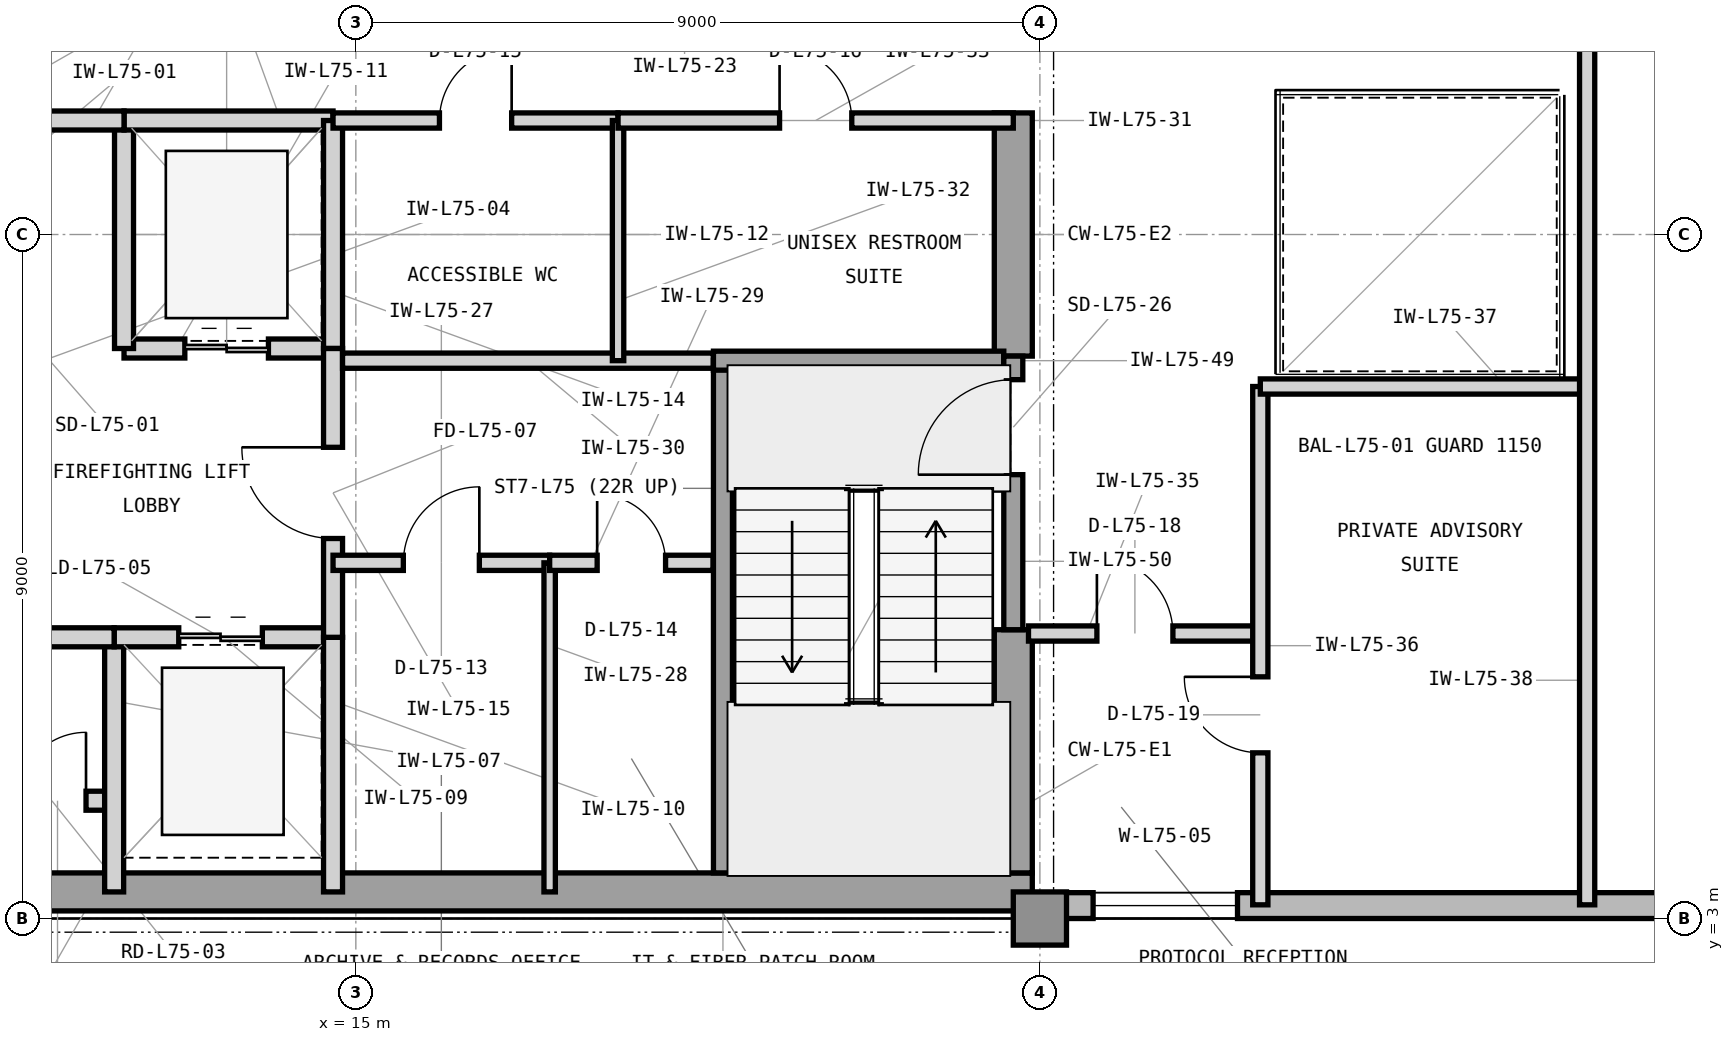
"""IFC4 building model, lengths in metres.
Left out: names, types, materials, properties, quantities, classifications, styles, units other than length and angle.
Written with IfcOpenShell. Run it as: python <this file> out.ifc"""

import sys

from ifc_helpers import new_model, si_unit, direction, frame, frame_2d, origin, origin_2d, place, context, subcontext, project, spatial, rectangle, extrude, element, fill, save


model = new_model("IFC4")
c1 = context("Model", 3, precision=1e-05, world=origin(), true_north=direction((0.0, 1.0)))
c2 = subcontext(c1, "Body", "Model", "MODEL_VIEW")
j1 = project(units=[si_unit("LENGTHUNIT", "METRE"), si_unit("PLANEANGLEUNIT", "RADIAN")], contexts=[c1])
p1 = place(None, origin())
s1 = spatial("IfcSite", under=j1, at=p1, CompositionType="ELEMENT")
p2 = place(p1, origin())
s2 = spatial("IfcBuilding", under=s1, at=p2, CompositionType="ELEMENT")
p3 = place(p2, frame((0.0, 0.0, 305.4)))
s3 = spatial("IfcBuildingStorey", under=s2, at=p3, CompositionType="ELEMENT", Elevation=305.4)
p4 = place(p3, frame((7.475, 3.35, 0.0), z_axis=(0.0, 0.0, 1.0), x_axis=(1.0, 0.0, 0.0)))
e1 = element("IfcWall", 1, at=p4, inside=s3, PredefinedType="SHEAR", context=c2, shape_type="SweptSolid", body=[
    extrude(rectangle(XDim=16.425, YDim=0.5, at=frame_2d((8.212, 0.0))), origin(), (0.0, 0.0, 1.0), 3.9),
])
p5 = place(p3, frame((23.65, 3.6, 0.0), z_axis=(0.0, 0.0, 1.0), x_axis=(0.0, 1.0, 0.0)))
e2 = element("IfcWall", 2, at=p5, inside=s3, PredefinedType="SHEAR", context=c2, shape_type="SweptSolid", body=[
    extrude(rectangle(XDim=3.2, YDim=0.5, at=frame_2d((1.6, 0.0))), origin(), (0.0, 0.0, 1.0), 3.9),
])
p6 = place(p3, frame((23.65, 10.4, 0.0), z_axis=(0.0, 0.0, 1.0), x_axis=(0.0, 1.0, 0.0)))
e3 = element("IfcWall", 3, at=p6, inside=s3, PredefinedType="SHEAR", context=c2, shape_type="SweptSolid", body=[
    extrude(rectangle(XDim=3.2, YDim=0.5, at=frame_2d((1.6, 0.0))), origin(), (0.0, 0.0, 1.0), 3.9),
])
p7 = place(p3, frame((24.0, 3.0, 0.0), z_axis=(0.0, 0.0, 1.0), x_axis=(1.0, 0.0, 0.0)))
e4 = element("IfcColumn", 4, at=p7, inside=s3, PredefinedType="COLUMN", context=c2, shape_type="SweptSolid", body=[
    extrude(rectangle(XDim=0.7, YDim=0.7, at=origin_2d()), origin(), (0.0, 0.0, 1.0), 3.9),
])
p8 = place(p3, frame((23.9, 3.17, 0.0), z_axis=(0.0, 0.0, 1.0), x_axis=(1.0, 0.0, 0.0)))
e5 = element("IfcWall", 5, at=p8, inside=s3, PredefinedType="STANDARD", context=c2, shape_type="SweptSolid", body=[
    extrude(rectangle(XDim=25.5, YDim=0.34, at=frame_2d((12.75, 0.0))), origin(), (0.0, 0.0, 1.0), 3.715),
])
p9 = place(p8, frame((0.8, 0.0, 0.8)))
e6 = element("IfcOpeningElement", 6, at=p9, cuts=e5, PredefinedType="OPENING", context=c2, shape_type="SweptSolid", body=[
    extrude(rectangle(XDim=1.9, YDim=2.35, at=frame_2d((0.95, 1.175))), frame((0.0, 0.18, 0.0), z_axis=(0.0, -1.0, 0.0), x_axis=(1.0, 0.0, 0.0)), (0.0, 0.0, 1.0), 0.36),
])
p10 = place(p8, frame((10.075, 0.0, 0.8)))
e7 = element("IfcOpeningElement", 7, at=p10, cuts=e5, PredefinedType="OPENING", context=c2, shape_type="SweptSolid", body=[
    extrude(rectangle(XDim=2.6, YDim=2.35, at=frame_2d((1.3, 1.175))), frame((0.0, 0.18, 0.0), z_axis=(0.0, -1.0, 0.0), x_axis=(1.0, 0.0, 0.0)), (0.0, 0.0, 1.0), 0.36),
])
p11 = place(p8, frame((14.525, 0.0, 0.8)))
e8 = element("IfcOpeningElement", 8, at=p11, cuts=e5, PredefinedType="OPENING", context=c2, shape_type="SweptSolid", body=[
    extrude(rectangle(XDim=2.6, YDim=2.35, at=frame_2d((1.3, 1.175))), frame((0.0, 0.18, 0.0), z_axis=(0.0, -1.0, 0.0), x_axis=(1.0, 0.0, 0.0)), (0.0, 0.0, 1.0), 0.36),
])
p12 = place(p3, frame((10.33, 4.55, 0.0), z_axis=(0.0, 0.0, 1.0), x_axis=(1.0, 0.0, 0.0)))
e9 = element("IfcWall", 9, at=p12, inside=s3, PredefinedType="PARTITIONING", context=c2, shape_type="SweptSolid", body=[
    extrude(rectangle(XDim=1.49, YDim=0.25, at=frame_2d((0.745, 0.0))), origin(), (0.0, 0.0, 1.0), 3.705),
])
p13 = place(p12, frame((0.22, 0.0, 0.0)))
e10 = element("IfcOpeningElement", 10, at=p13, cuts=e9, PredefinedType="OPENING", context=c2, shape_type="SweptSolid", body=[
    extrude(rectangle(XDim=0.9, YDim=2.1, at=frame_2d((0.45, 1.05))), frame((0.0, 0.135, 0.0), z_axis=(0.0, -1.0, 0.0), x_axis=(1.0, 0.0, 0.0)), (0.0, 0.0, 1.0), 0.27),
])
p14 = place(p3, frame((11.82, 3.35, 0.0), z_axis=(0.0, 0.0, 1.0), x_axis=(0.0, 1.0, 0.0)))
e11 = element("IfcWall", 11, at=p14, inside=s3, PredefinedType="PARTITIONING", context=c2, shape_type="SweptSolid", body=[
    extrude(rectangle(XDim=3.35, YDim=0.25, at=frame_2d((1.675, 0.0))), origin(), (0.0, 0.0, 1.0), 3.705),
])
p15 = place(p3, frame((11.82, 6.7, 0.0), z_axis=(0.0, 0.0, 1.0), x_axis=(1.0, 0.0, 0.0)))
e12 = element("IfcWall", 12, at=p15, inside=s3, PredefinedType="PARTITIONING", context=c2, shape_type="SweptSolid", body=[
    extrude(rectangle(XDim=2.88, YDim=0.25, at=frame_2d((1.44, 0.0))), origin(), (0.0, 0.0, 1.0), 3.354),
])
p16 = place(p15, frame((0.85, 0.0, 0.0)))
e13 = element("IfcOpeningElement", 13, at=p16, cuts=e12, PredefinedType="OPENING", context=c2, shape_type="SweptSolid", body=[
    extrude(rectangle(XDim=1.1, YDim=2.25, at=frame_2d((0.55, 1.125))), frame((0.0, 0.135, 0.0), z_axis=(0.0, -1.0, 0.0), x_axis=(1.0, 0.0, 0.0)), (0.0, 0.0, 1.0), 0.27),
])
p17 = place(p3, frame((14.7, 3.35, 0.0), z_axis=(0.0, 0.0, 1.0), x_axis=(0.0, 1.0, 0.0)))
e14 = element("IfcWall", 14, at=p17, inside=s3, PredefinedType="PARTITIONING", context=c2, shape_type="SweptSolid", body=[
    extrude(rectangle(XDim=3.35, YDim=0.25, at=frame_2d((1.675, 0.0))), origin(), (0.0, 0.0, 1.0), 3.705),
])
p18 = place(p3, frame((11.95, 10.5, 0.0), z_axis=(0.0, 0.0, 1.0), x_axis=(1.0, 0.0, 0.0)))
e15 = element("IfcWall", 15, at=p18, inside=s3, PredefinedType="PARTITIONING", context=c2, shape_type="SweptSolid", body=[
    extrude(rectangle(XDim=2.75, YDim=0.25, at=frame_2d((1.375, 0.0))), origin(), (0.0, 0.0, 1.0), 3.354),
])
p19 = place(p18, frame((0.8, 0.0, 0.0)))
e16 = element("IfcOpeningElement", 16, at=p19, cuts=e15, PredefinedType="OPENING", context=c2, shape_type="SweptSolid", body=[
    extrude(rectangle(XDim=1.1, YDim=2.25, at=frame_2d((0.55, 1.125))), frame((0.0, 0.135, 0.0), z_axis=(0.0, -1.0, 0.0), x_axis=(1.0, 0.0, 0.0)), (0.0, 0.0, 1.0), 0.27),
])
p20 = place(p3, frame((11.95, 10.5, 0.0), z_axis=(0.0, 0.0, 1.0), x_axis=(0.0, 1.0, 0.0)))
e17 = element("IfcWall", 17, at=p20, inside=s3, PredefinedType="PARTITIONING", context=c2, shape_type="SweptSolid", body=[
    extrude(rectangle(XDim=3.0, YDim=0.25, at=frame_2d((1.5, 0.0))), origin(), (0.0, 0.0, 1.0), 3.705),
])
p21 = place(p3, frame((11.95, 13.5, 0.0), z_axis=(0.0, 0.0, 1.0), x_axis=(1.0, 0.0, 0.0)))
e18 = element("IfcWall", 18, at=p21, inside=s3, PredefinedType="PARTITIONING", context=c2, shape_type="SweptSolid", body=[
    extrude(rectangle(XDim=2.75, YDim=0.25, at=frame_2d((1.375, 0.0))), origin(), (0.0, 0.0, 1.0), 3.354),
])
p22 = place(p3, frame((14.7, 10.5, 0.0), z_axis=(0.0, 0.0, 1.0), x_axis=(0.0, 1.0, 0.0)))
e19 = element("IfcWall", 19, at=p22, inside=s3, PredefinedType="PARTITIONING", context=c2, shape_type="SweptSolid", body=[
    extrude(rectangle(XDim=3.0, YDim=0.25, at=frame_2d((1.5, 0.0))), origin(), (0.0, 0.0, 1.0), 3.705),
])
p23 = place(p3, frame((14.7, 6.7, 0.0), z_axis=(0.0, 0.0, 1.0), x_axis=(0.0, 1.0, 0.0)))
e20 = element("IfcWall", 20, at=p23, inside=s3, PredefinedType="PARTITIONING", context=c2, shape_type="SweptSolid", body=[
    extrude(rectangle(XDim=3.8, YDim=0.25, at=frame_2d((1.9, 0.0))), origin(), (0.0, 0.0, 1.0), 3.705),
])
p24 = place(p23, frame((1.3, 0.0, 0.0)))
e21 = element("IfcOpeningElement", 21, at=p24, cuts=e20, PredefinedType="OPENING", context=c2, shape_type="SweptSolid", body=[
    extrude(rectangle(XDim=1.2, YDim=2.2, at=frame_2d((0.6, 1.1))), frame((0.0, 0.135, 0.0), z_axis=(0.0, -1.0, 0.0), x_axis=(1.0, 0.0, 0.0)), (0.0, 0.0, 1.0), 0.27),
])
p25 = place(p3, frame((10.33, 13.5, 0.0), z_axis=(0.0, 0.0, 1.0), x_axis=(1.0, 0.0, 0.0)))
e22 = element("IfcWall", 22, at=p25, inside=s3, PredefinedType="PARTITIONING", context=c2, shape_type="SweptSolid", body=[
    extrude(rectangle(XDim=1.62, YDim=0.25, at=frame_2d((0.81, 0.0))), origin(), (0.0, 0.0, 1.0), 3.354),
])
p26 = place(p3, frame((10.33, 6.7, 0.0), z_axis=(0.0, 0.0, 1.0), x_axis=(1.0, 0.0, 0.0)))
e23 = element("IfcWall", 23, at=p26, inside=s3, PredefinedType="PARTITIONING", context=c2, shape_type="SweptSolid", body=[
    extrude(rectangle(XDim=1.49, YDim=0.25, at=frame_2d((0.745, 0.0))), origin(), (0.0, 0.0, 1.0), 3.354),
])
p27 = place(p3, frame((14.7, 7.68, 0.0), z_axis=(0.0, 0.0, 1.0), x_axis=(1.0, 0.0, 0.0)))
e24 = element("IfcWall", 24, at=p27, inside=s3, PredefinedType="PARTITIONING", context=c2, shape_type="SweptSolid", body=[
    extrude(rectangle(XDim=2.85, YDim=0.2, at=frame_2d((1.425, 0.0))), origin(), (0.0, 0.0, 1.0), 3.705),
])
p28 = place(p27, frame((0.925, 0.0, 0.0)))
e25 = element("IfcOpeningElement", 25, at=p28, cuts=e24, PredefinedType="OPENING", context=c2, shape_type="SweptSolid", body=[
    extrude(rectangle(XDim=1.0, YDim=2.15, at=frame_2d((0.5, 1.075))), frame((0.0, 0.11, 0.0), z_axis=(0.0, -1.0, 0.0), x_axis=(1.0, 0.0, 0.0)), (0.0, 0.0, 1.0), 0.22),
])
p29 = place(p3, frame((17.55, 3.35, 0.0), z_axis=(0.0, 0.0, 1.0), x_axis=(0.0, 1.0, 0.0)))
e26 = element("IfcWall", 26, at=p29, inside=s3, PredefinedType="PARTITIONING", context=c2, shape_type="SweptSolid", body=[
    extrude(rectangle(XDim=4.33, YDim=0.15, at=frame_2d((2.165, 0.0))), origin(), (0.0, 0.0, 1.0), 3.705),
])
p30 = place(p3, frame((17.55, 7.68, 0.0), z_axis=(0.0, 0.0, 1.0), x_axis=(1.0, 0.0, 0.0)))
e27 = element("IfcWall", 27, at=p30, inside=s3, PredefinedType="PARTITIONING", context=c2, shape_type="SweptSolid", body=[
    extrude(rectangle(XDim=2.15, YDim=0.2, at=frame_2d((1.075, 0.0))), origin(), (0.0, 0.0, 1.0), 3.705),
])
p31 = place(p30, frame((0.625, 0.0, 0.0)))
e28 = element("IfcOpeningElement", 28, at=p31, cuts=e27, PredefinedType="OPENING", context=c2, shape_type="SweptSolid", body=[
    extrude(rectangle(XDim=0.9, YDim=2.1, at=frame_2d((0.45, 1.05))), frame((0.0, 0.11, 0.0), z_axis=(0.0, -1.0, 0.0), x_axis=(1.0, 0.0, 0.0)), (0.0, 0.0, 1.0), 0.22),
])
p32 = place(p3, frame((14.825, 10.34, 0.0), z_axis=(0.0, 0.0, 1.0), x_axis=(1.0, 0.0, 0.0)))
e29 = element("IfcWall", 29, at=p32, inside=s3, PredefinedType="PARTITIONING", context=c2, shape_type="SweptSolid", body=[
    extrude(rectangle(XDim=4.88, YDim=0.2, at=frame_2d((2.44, 0.0))), origin(), (0.0, 0.0, 1.0), 3.705),
])
p33 = place(p3, frame((14.7, 13.5, 0.0), z_axis=(0.0, 0.0, 1.0), x_axis=(1.0, 0.0, 0.0)))
e30 = element("IfcWall", 30, at=p33, inside=s3, PredefinedType="PARTITIONING", context=c2, shape_type="SweptSolid", body=[
    extrude(rectangle(XDim=3.75, YDim=0.2, at=frame_2d((1.875, 0.0))), origin(), (0.0, 0.0, 1.0), 3.354),
])
p34 = place(p33, frame((1.4, 0.0, 0.0)))
e31 = element("IfcOpeningElement", 31, at=p34, cuts=e30, PredefinedType="OPENING", context=c2, shape_type="SweptSolid", body=[
    extrude(rectangle(XDim=0.95, YDim=2.1, at=frame_2d((0.475, 1.05))), frame((0.0, 0.11, 0.0), z_axis=(0.0, -1.0, 0.0), x_axis=(1.0, 0.0, 0.0)), (0.0, 0.0, 1.0), 0.22),
])
p35 = place(p3, frame((18.45, 10.34, 0.0), z_axis=(0.0, 0.0, 1.0), x_axis=(0.0, 1.0, 0.0)))
e32 = element("IfcWall", 32, at=p35, inside=s3, PredefinedType="PARTITIONING", context=c2, shape_type="SweptSolid", body=[
    extrude(rectangle(XDim=3.16, YDim=0.15, at=frame_2d((1.58, 0.0))), origin(), (0.0, 0.0, 1.0), 3.705),
])
p36 = place(p3, frame((18.45, 13.5, 0.0), z_axis=(0.0, 0.0, 1.0), x_axis=(1.0, 0.0, 0.0)))
e33 = element("IfcWall", 33, at=p36, inside=s3, PredefinedType="PARTITIONING", context=c2, shape_type="SweptSolid", body=[
    extrude(rectangle(XDim=5.2, YDim=0.2, at=frame_2d((2.6, 0.0))), origin(), (0.0, 0.0, 1.0), 3.354),
])
p37 = place(p36, frame((2.125, 0.0, 0.0)))
e34 = element("IfcOpeningElement", 34, at=p37, cuts=e33, PredefinedType="OPENING", context=c2, shape_type="SweptSolid", body=[
    extrude(rectangle(XDim=0.95, YDim=2.1, at=frame_2d((0.475, 1.05))), frame((0.0, 0.11, 0.0), z_axis=(0.0, -1.0, 0.0), x_axis=(1.0, 0.0, 0.0)), (0.0, 0.0, 1.0), 0.22),
])
p38 = place(p3, frame((23.85, 6.75, 0.0), z_axis=(0.0, 0.0, 1.0), x_axis=(1.0, 0.0, 0.0)))
e35 = element("IfcWall", 35, at=p38, inside=s3, PredefinedType="PARTITIONING", context=c2, shape_type="SweptSolid", body=[
    extrude(rectangle(XDim=3.05, YDim=0.2, at=frame_2d((1.525, 0.0))), origin(), (0.0, 0.0, 1.0), 3.705),
])
p39 = place(p38, frame((0.9, 0.0, 0.0)))
e36 = element("IfcOpeningElement", 36, at=p39, cuts=e35, PredefinedType="OPENING", context=c2, shape_type="SweptSolid", body=[
    extrude(rectangle(XDim=1.0, YDim=2.15, at=frame_2d((0.5, 1.075))), frame((0.0, 0.11, 0.0), z_axis=(0.0, -1.0, 0.0), x_axis=(1.0, 0.0, 0.0)), (0.0, 0.0, 1.0), 0.22),
])
p40 = place(p3, frame((26.9, 3.18, 0.0), z_axis=(0.0, 0.0, 1.0), x_axis=(0.0, 1.0, 0.0)))
e37 = element("IfcWall", 37, at=p40, inside=s3, PredefinedType="PARTITIONING", context=c2, shape_type="SweptSolid", body=[
    extrude(rectangle(XDim=6.82, YDim=0.2, at=frame_2d((3.41, 0.0))), origin(), (0.0, 0.0, 1.0), 3.705),
])
p41 = place(p40, frame((2.0, 0.0, 0.0)))
e38 = element("IfcOpeningElement", 38, at=p41, cuts=e37, PredefinedType="OPENING", context=c2, shape_type="SweptSolid", body=[
    extrude(rectangle(XDim=1.0, YDim=2.15, at=frame_2d((0.5, 1.075))), frame((0.0, 0.11, 0.0), z_axis=(0.0, -1.0, 0.0), x_axis=(1.0, 0.0, 0.0)), (0.0, 0.0, 1.0), 0.22),
])
p42 = place(p3, frame((26.9, 10.0, 0.0), z_axis=(0.0, 0.0, 1.0), x_axis=(1.0, 0.0, 0.0)))
e39 = element("IfcWall", 39, at=p42, inside=s3, PredefinedType="PARTITIONING", context=c2, shape_type="SweptSolid", body=[
    extrude(rectangle(XDim=4.3, YDim=0.2, at=frame_2d((2.15, 0.0))), origin(), (0.0, 0.0, 1.0), 3.705),
])
p43 = place(p3, frame((31.2, 3.18, 0.0), z_axis=(0.0, 0.0, 1.0), x_axis=(0.0, 1.0, 0.0)))
e40 = element("IfcWall", 40, at=p43, inside=s3, PredefinedType="PARTITIONING", context=c2, shape_type="SweptSolid", body=[
    extrude(rectangle(XDim=11.82, YDim=0.2, at=frame_2d((5.91, 0.0))), origin(), (0.0, 0.0, 1.0), 3.705),
])
p44 = place(p3, frame((19.83, 3.6, 0.0), z_axis=(0.0, 0.0, 1.0), x_axis=(0.0, 1.0, 0.0)))
e41 = element("IfcWall", 41, at=p44, inside=s3, PredefinedType="SHEAR", context=c2, shape_type="SweptSolid", body=[
    extrude(rectangle(XDim=6.74, YDim=0.25, at=frame_2d((3.37, 0.0))), origin(), (0.0, 0.0, 1.0), 3.9),
])
p45 = place(p3, frame((19.705, 10.34, 0.0), z_axis=(0.0, 0.0, 1.0), x_axis=(1.0, 0.0, 0.0)))
e42 = element("IfcWall", 42, at=p45, inside=s3, PredefinedType="SHEAR", context=c2, shape_type="SweptSolid", body=[
    extrude(rectangle(XDim=3.82, YDim=0.25, at=frame_2d((1.91, 0.0))), origin(), (0.0, 0.0, 1.0), 3.9),
])
p46 = place(p3, frame((23.65, 6.8, 0.0), z_axis=(0.0, 0.0, 1.0), x_axis=(0.0, 1.0, 0.0)))
e43 = element("IfcWall", 43, at=p46, inside=s3, PredefinedType="SHEAR", context=c2, shape_type="SweptSolid", body=[
    extrude(rectangle(XDim=3.6, YDim=0.25, at=frame_2d((1.8, 0.0))), origin(), (0.0, 0.0, 1.0), 3.9),
])
p47 = place(p46, frame((2.04, 0.0, 0.0)))
e44 = element("IfcOpeningElement", 44, at=p47, cuts=e43, PredefinedType="OPENING", context=c2, shape_type="SweptSolid", body=[
    extrude(rectangle(XDim=1.25, YDim=2.2, at=frame_2d((0.625, 1.1))), frame((0.0, 0.135, 0.0), z_axis=(0.0, -1.0, 0.0), x_axis=(1.0, 0.0, 0.0)), (0.0, 0.0, 1.0), 0.27),
])
p48 = place(p13, origin())
e45 = element("IfcDoor", 45, at=p48, inside=s3, OperationType="SINGLE_SWING_RIGHT", PredefinedType="TRAPDOOR", context=c2, shape_type="SweptSolid", body=[
    extrude(rectangle(XDim=0.9, YDim=2.1, at=frame_2d((0.45, 1.05))), frame((0.0, 0.025, 0.0), z_axis=(0.0, -1.0, 0.0), x_axis=(1.0, 0.0, 0.0)), (0.0, 0.0, 1.0), 0.05),
])
fill(e10, e45)
p49 = place(p16, origin())
e46 = element("IfcDoor", 46, at=p49, inside=s3, OperationType="DOUBLE_DOOR_SLIDING", PredefinedType="DOOR", context=c2, shape_type="SweptSolid", body=[
    extrude(rectangle(XDim=1.1, YDim=2.25, at=frame_2d((0.55, 1.125))), frame((0.0, 0.025, 0.0), z_axis=(0.0, -1.0, 0.0), x_axis=(1.0, 0.0, 0.0)), (0.0, 0.0, 1.0), 0.05),
])
fill(e13, e46)
p50 = place(p19, origin())
e47 = element("IfcDoor", 47, at=p50, inside=s3, OperationType="DOUBLE_DOOR_SLIDING", PredefinedType="DOOR", context=c2, shape_type="SweptSolid", body=[
    extrude(rectangle(XDim=1.1, YDim=2.25, at=frame_2d((0.55, 1.125))), frame((0.0, 0.025, 0.0), z_axis=(0.0, -1.0, 0.0), x_axis=(1.0, 0.0, 0.0)), (0.0, 0.0, 1.0), 0.05),
])
fill(e16, e47)
p51 = place(p24, origin())
e48 = element("IfcDoor", 48, at=p51, inside=s3, OperationType="SINGLE_SWING_RIGHT", PredefinedType="DOOR", context=c2, shape_type="SweptSolid", body=[
    extrude(rectangle(XDim=1.2, YDim=2.2, at=frame_2d((0.6, 1.1))), frame((0.0, 0.025, 0.0), z_axis=(0.0, -1.0, 0.0), x_axis=(1.0, 0.0, 0.0)), (0.0, 0.0, 1.0), 0.05),
])
fill(e21, e48)
p52 = place(p28, origin())
e49 = element("IfcDoor", 49, at=p52, inside=s3, OperationType="SINGLE_SWING_RIGHT", PredefinedType="DOOR", context=c2, shape_type="SweptSolid", body=[
    extrude(rectangle(XDim=1.0, YDim=2.15, at=frame_2d((0.5, 1.075))), frame((0.0, 0.025, 0.0), z_axis=(0.0, -1.0, 0.0), x_axis=(1.0, 0.0, 0.0)), (0.0, 0.0, 1.0), 0.05),
])
fill(e25, e49)
p53 = place(p31, origin())
e50 = element("IfcDoor", 50, at=p53, inside=s3, OperationType="SINGLE_SWING_LEFT", PredefinedType="TRAPDOOR", context=c2, shape_type="SweptSolid", body=[
    extrude(rectangle(XDim=0.9, YDim=2.1, at=frame_2d((0.45, 1.05))), frame((0.0, 0.025, 0.0), z_axis=(0.0, -1.0, 0.0), x_axis=(1.0, 0.0, 0.0)), (0.0, 0.0, 1.0), 0.05),
])
fill(e28, e50)
p54 = place(p34, origin())
e51 = element("IfcDoor", 51, at=p54, inside=s3, OperationType="SINGLE_SWING_RIGHT", PredefinedType="DOOR", context=c2, shape_type="SweptSolid", body=[
    extrude(rectangle(XDim=0.95, YDim=2.1, at=frame_2d((0.475, 1.05))), frame((0.0, 0.025, 0.0), z_axis=(0.0, -1.0, 0.0), x_axis=(1.0, 0.0, 0.0)), (0.0, 0.0, 1.0), 0.05),
])
fill(e31, e51)
p55 = place(p37, origin())
e52 = element("IfcDoor", 52, at=p55, inside=s3, OperationType="SINGLE_SWING_LEFT", PredefinedType="DOOR", context=c2, shape_type="SweptSolid", body=[
    extrude(rectangle(XDim=0.95, YDim=2.1, at=frame_2d((0.475, 1.05))), frame((0.0, 0.025, 0.0), z_axis=(0.0, -1.0, 0.0), x_axis=(1.0, 0.0, 0.0)), (0.0, 0.0, 1.0), 0.05),
])
fill(e34, e52)
p56 = place(p39, origin())
e53 = element("IfcDoor", 53, at=p56, inside=s3, OperationType="SINGLE_SWING_LEFT", PredefinedType="DOOR", context=c2, shape_type="SweptSolid", body=[
    extrude(rectangle(XDim=1.0, YDim=2.15, at=frame_2d((0.5, 1.075))), frame((0.0, 0.025, 0.0), z_axis=(0.0, -1.0, 0.0), x_axis=(1.0, 0.0, 0.0)), (0.0, 0.0, 1.0), 0.05),
])
fill(e36, e53)
p57 = place(p41, origin())
e54 = element("IfcDoor", 54, at=p57, inside=s3, OperationType="SINGLE_SWING_RIGHT", PredefinedType="DOOR", context=c2, shape_type="SweptSolid", body=[
    extrude(rectangle(XDim=1.0, YDim=2.15, at=frame_2d((0.5, 1.075))), frame((0.0, 0.025, 0.0), z_axis=(0.0, -1.0, 0.0), x_axis=(1.0, 0.0, 0.0)), (0.0, 0.0, 1.0), 0.05),
])
fill(e38, e54)
p58 = place(p47, origin())
e55 = element("IfcDoor", 55, at=p58, inside=s3, OperationType="SINGLE_SWING_LEFT", PredefinedType="DOOR", context=c2, shape_type="SweptSolid", body=[
    extrude(rectangle(XDim=1.25, YDim=2.2, at=frame_2d((0.625, 1.1))), frame((0.0, 0.025, 0.0), z_axis=(0.0, -1.0, 0.0), x_axis=(1.0, 0.0, 0.0)), (0.0, 0.0, 1.0), 0.05),
])
fill(e44, e55)
p59 = place(p9, origin())
e56 = element("IfcWindow", 56, at=p59, inside=s3, PartitioningType="SINGLE_PANEL", PredefinedType="WINDOW", context=c2, shape_type="SweptSolid", body=[
    extrude(rectangle(XDim=1.9, YDim=2.35, at=frame_2d((0.95, 1.175))), frame((0.0, 0.11, 0.0), z_axis=(0.0, -1.0, 0.0), x_axis=(1.0, 0.0, 0.0)), (0.0, 0.0, 1.0), 0.06),
])
fill(e6, e56)
save(model, sys.argv[1])
